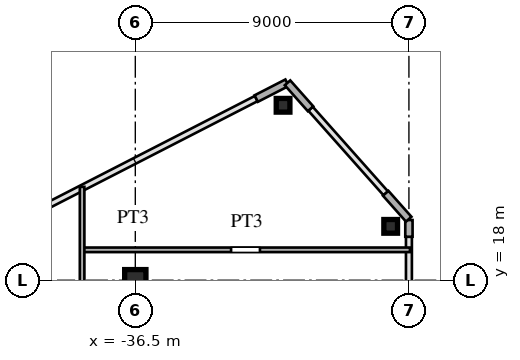
"""IFC4 building model, lengths in metres.
Left out: names, types, materials, properties, quantities, classifications, styles, units other than length and angle.
Written with IfcOpenShell. Run it as: python <this file> out.ifc"""

import sys

from ifc_helpers import new_model, si_unit, direction, frame, frame_2d, origin, origin_2d, place, context, subcontext, project, spatial, rectangle, hollow_rectangle, i_section, extrude, source, transform, mapped, element, save


model = new_model("IFC4")
c1 = context("Model", 3, precision=1e-05, world=origin(), true_north=direction((0.0, 1.0)))
c2 = subcontext(c1, "Body", "Model", "MODEL_VIEW")
j1 = project(units=[si_unit("LENGTHUNIT", "METRE"), si_unit("PLANEANGLEUNIT", "RADIAN")], contexts=[c1])
p1 = place(None, origin())
s1 = spatial("IfcSite", under=j1, at=p1, CompositionType="ELEMENT")
p2 = place(p1, origin())
s2 = spatial("IfcBuilding", under=s1, at=p2, CompositionType="ELEMENT")
p3 = place(p2, frame((0.0, 0.0, 114.0)))
s3 = spatial("IfcBuildingStorey", under=s2, at=p3, CompositionType="ELEMENT", Elevation=114.0)
m1 = source(origin(), c2, "Body", "SweptSolid", [
    extrude(i_section(OverallWidth=0.7, OverallDepth=0.7, WebThickness=0.028, FlangeThickness=0.045, at=origin_2d()), origin(), (0.0, 0.0, 1.0), 3.6),
])
p4 = place(p3, frame((-36.5, 18.0, 0.0), z_axis=(0.0, 0.0, 1.0), x_axis=(1.0, 0.0, 0.0)))
e1 = element("IfcColumn", 1, at=p4, inside=s3, PredefinedType="COLUMN", context=c2, shape_type="MappedRepresentation", body=[
    mapped(m1, transform((0.0, 0.0, 0.0), scale=1.0)),
])
m2 = source(origin(), c2, "Body", "SweptSolid", [
    extrude(hollow_rectangle(XDim=0.45, YDim=0.45, WallThickness=0.018, at=origin_2d()), origin(), (0.0, 0.0, 1.0), 3.6),
])
for number, where, z_axis, x_axis in (
    (2, (-28.1, 19.772, 0.0), (0.0, 0.0, 1.0), (1.0, 0.0, 0.0)),
    (3, (-31.64, 23.754, 0.0), (0.0, 0.0, 1.0), (1.0, 0.0, 0.0)),
):
    element("IfcColumn", number, at=place(p3, frame(where, z_axis=z_axis, x_axis=x_axis)), inside=s3, PredefinedType="COLUMN", context=c2, shape_type="MappedRepresentation", body=[
        mapped(m2, transform((0.0, 0.0, 0.0), scale=1.0)),
    ])
p5 = place(p3, frame((-27.5, 19.43, 0.0), z_axis=(0.0, 0.0, 1.0), x_axis=(0.0, 1.0, 0.0)))
e4 = element("IfcWall", 4, at=p5, inside=s3, PredefinedType="SOLIDWALL", context=c2, shape_type="SweptSolid", body=[
    extrude(rectangle(XDim=0.55, YDim=0.24, at=frame_2d((0.275, 0.0))), origin(), (0.0, 0.0, 1.0), 3.38),
])
for number, where, z_axis, x_axis in (
    (5, (-27.507, 20.008, 0.0), (0.0, 0.0, 1.0), (-0.664, 0.747, 0.0)),
    (6, (-30.736, 23.64, 0.0), (0.0, 0.0, 1.0), (-0.664, 0.747, 0.0)),
):
    element("IfcWall", number, at=place(p3, frame(where, z_axis=z_axis, x_axis=x_axis)), inside=s3, PredefinedType="SOLIDWALL", context=c2, shape_type="SweptSolid", body=[
        extrude(rectangle(XDim=1.14, YDim=0.24, at=frame_2d((0.57, 0.0))), origin(), (0.0, 0.0, 1.0), 3.38),
    ])
p6 = place(p3, frame((-31.509, 24.495, 0.0), z_axis=(0.0, 0.0, 1.0), x_axis=(-0.889797395748, -0.456355776255, 0.0)))
e7 = element("IfcWall", 7, at=p6, inside=s3, PredefinedType="SOLIDWALL", context=c2, shape_type="SweptSolid", body=[
    extrude(rectangle(XDim=1.14, YDim=0.24, at=frame_2d((0.57, 0.0))), origin(), (0.0, 0.0, 1.0), 3.38),
])
p7 = place(p3, frame((-38.2, 19.0, 0.0), z_axis=(0.0, 0.0, 1.0), x_axis=(1.0, 0.0, 0.0)))
e8 = element("IfcWall", 8, at=p7, inside=s3, PredefinedType="PARTITIONING", context=c2, shape_type="SweptSolid", body=[
    extrude(rectangle(XDim=10.735, YDim=0.15, at=frame_2d((5.367, 0.0))), origin(), (0.0, 0.0, 1.0), 3.38),
])
p8 = place(p7, frame((4.85, 0.0, 0.0)))
e9 = element("IfcOpeningElement", 9, at=p8, cuts=e8, PredefinedType="OPENING", context=c2, shape_type="SweptSolid", body=[
    extrude(rectangle(XDim=0.95, YDim=2.15, at=frame_2d((0.475, 1.075))), frame((0.0, 0.085, 0.0), z_axis=(0.0, -1.0, 0.0), x_axis=(1.0, 0.0, 0.0)), (0.0, 0.0, 1.0), 0.17),
])
p9 = place(p3, frame((-38.25, 15.65, 0.0), z_axis=(0.0, 0.0, 1.0), x_axis=(0.0, 1.0, 0.0)))
e10 = element("IfcWall", 10, at=p9, inside=s3, PredefinedType="PARTITIONING", context=c2, shape_type="SweptSolid", body=[
    extrude(rectangle(XDim=5.421, YDim=0.15, at=frame_2d((2.71, 0.0))), origin(), (0.0, 0.0, 1.0), 3.38),
])
p10 = place(p9, frame((1.175, 0.0, 0.0)))
e11 = element("IfcOpeningElement", 11, at=p10, cuts=e10, PredefinedType="OPENING", context=c2, shape_type="SweptSolid", body=[
    extrude(rectangle(XDim=0.95, YDim=2.15, at=frame_2d((0.475, 1.075))), frame((0.0, 0.085, 0.0), z_axis=(0.0, -1.0, 0.0), x_axis=(1.0, 0.0, 0.0)), (0.0, 0.0, 1.0), 0.17),
])
save(model, sys.argv[1])
